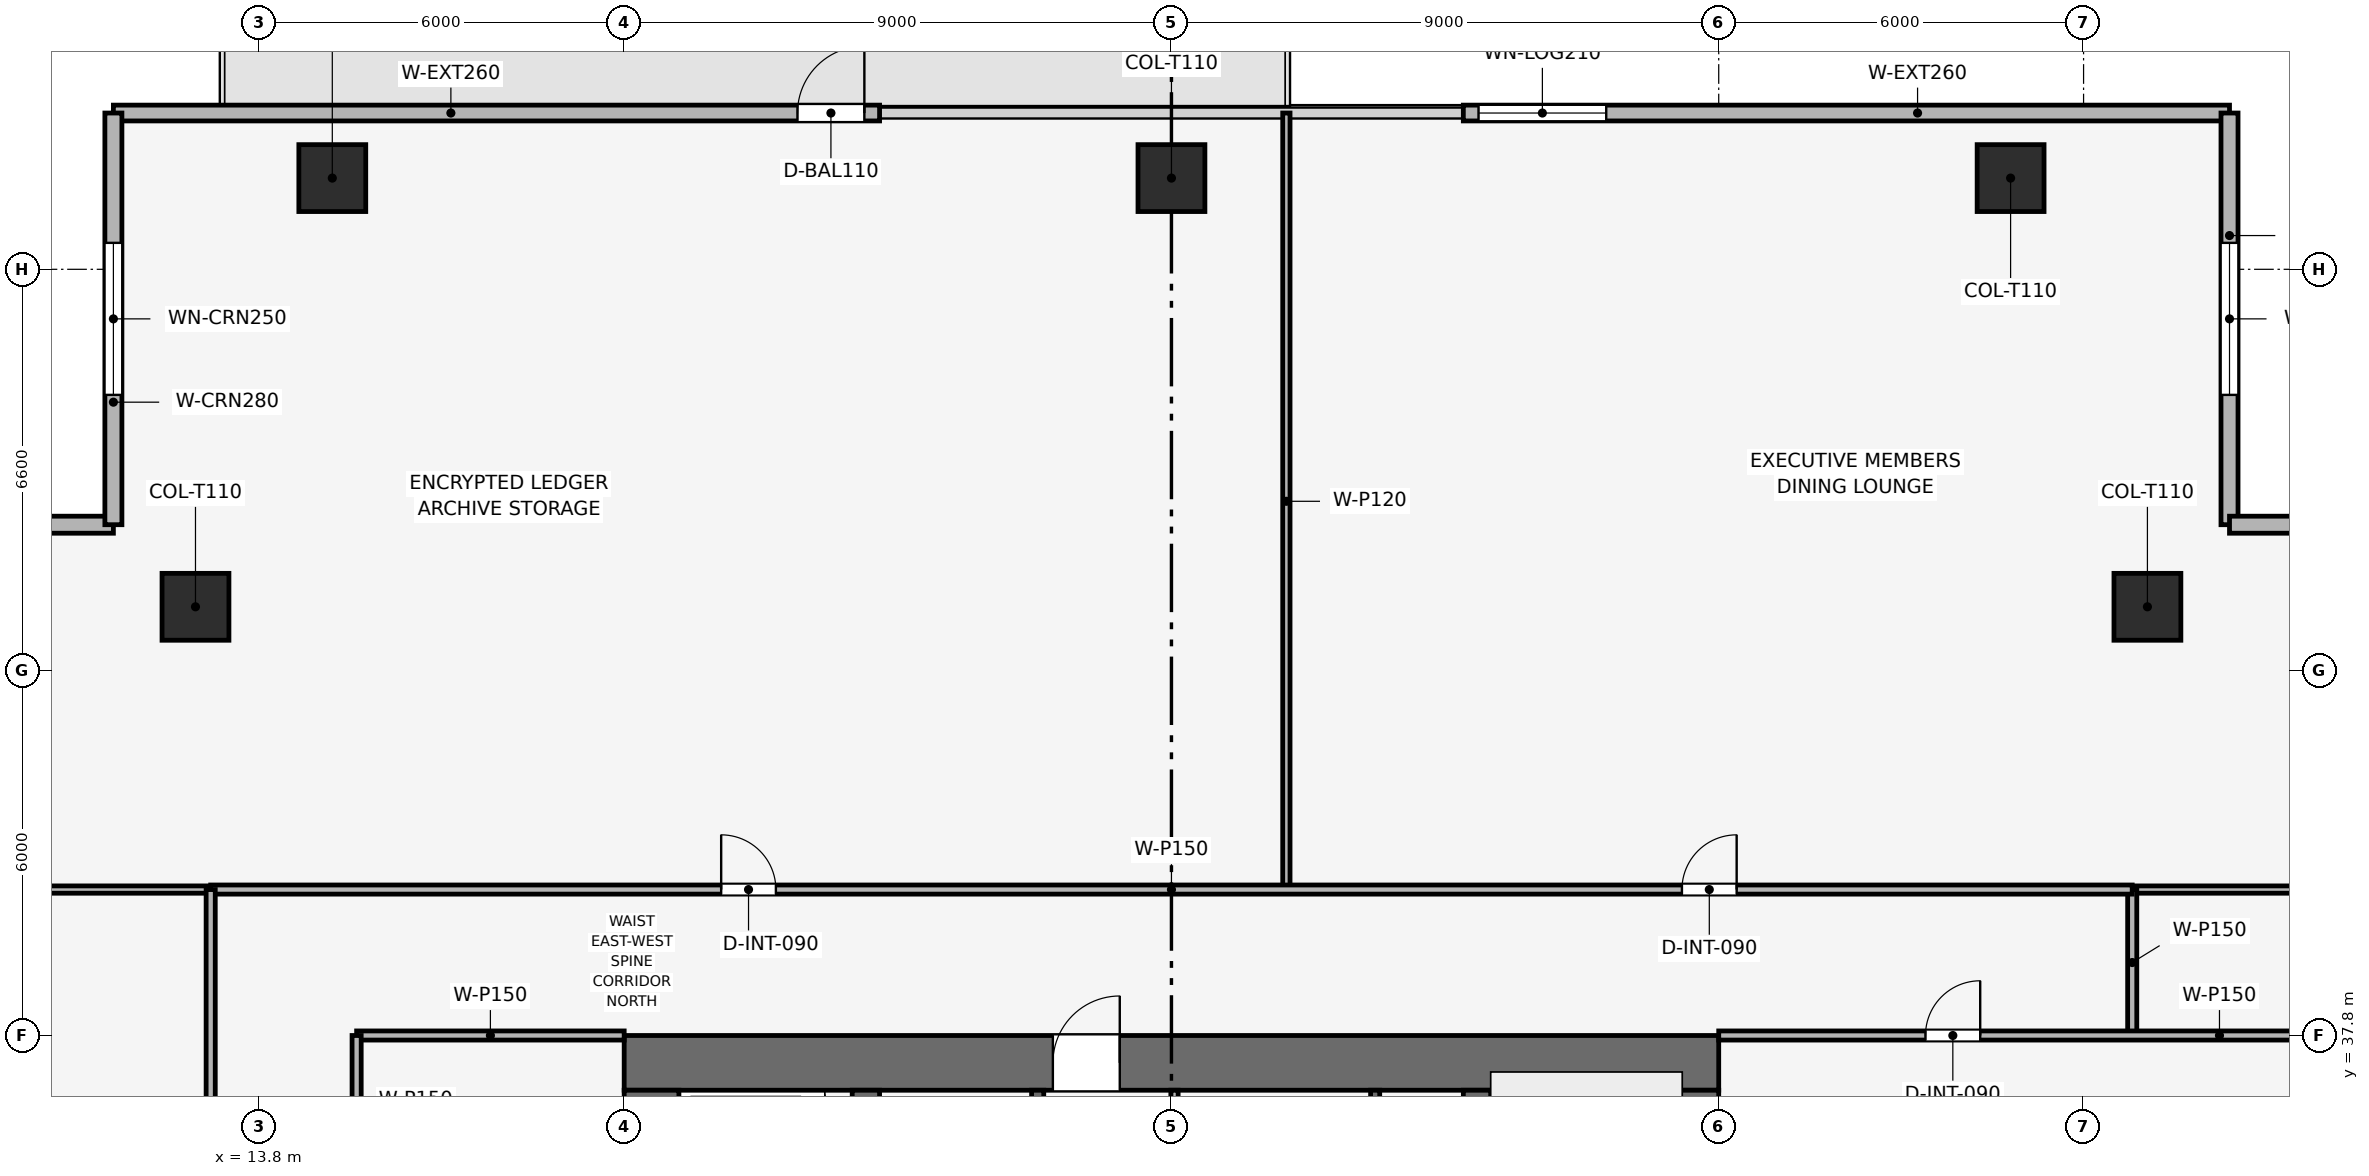
"""IFC4 building model, lengths in metres.
Left out: names, types, materials, properties, quantities, classifications, styles, units other than length and angle.
Written with IfcOpenShell. Run it as: python <this file> out.ifc"""

import sys

from ifc_helpers import new_model, si_unit, direction, frame, frame_2d, origin, origin_2d, place, context, subcontext, project, spatial, rectangle, extrude, element, fill, save


model = new_model("IFC4")
c1 = context("Model", 3, precision=1e-05, world=origin(), true_north=direction((0.0, 1.0)))
c2 = subcontext(c1, "Body", "Model", "MODEL_VIEW")
j1 = project(units=[si_unit("LENGTHUNIT", "METRE"), si_unit("PLANEANGLEUNIT", "RADIAN")], contexts=[c1])
p1 = place(None, origin())
s1 = spatial("IfcSite", under=j1, at=p1, CompositionType="ELEMENT")
p2 = place(p1, origin())
s2 = spatial("IfcBuilding", under=s1, at=p2, CompositionType="ELEMENT")
p3 = place(p2, frame((0.0, 0.0, 187.05)))
s3 = spatial("IfcBuildingStorey", under=s2, at=p3, CompositionType="ELEMENT", Elevation=187.05)
p4 = place(p3, frame((19.8, 37.35, 0.0), z_axis=(0.0, 0.0, 1.0), x_axis=(1.0, 0.0, 0.0)))
e1 = element("IfcWall", 1, at=p4, inside=s3, PredefinedType="SHEAR", context=c2, shape_type="SweptSolid", body=[
    extrude(rectangle(XDim=18.0, YDim=0.9, at=frame_2d((9.0, 0.0))), origin(), (0.0, 0.0, 1.0), 3.75),
])
p5 = place(p4, frame((7.05, 0.0, 0.0)))
e2 = element("IfcOpeningElement", 2, at=p5, cuts=e1, PredefinedType="OPENING", context=c2, shape_type="SweptSolid", body=[
    extrude(rectangle(XDim=1.1, YDim=2.15, at=frame_2d((0.55, 1.075))), frame((0.0, 0.46, 0.0), z_axis=(0.0, -1.0, 0.0), x_axis=(1.0, 0.0, 0.0)), (0.0, 0.0, 1.0), 0.92),
])
p6 = place(p3, frame((20.25, 20.7, 0.0), z_axis=(0.0, 0.0, 1.0), x_axis=(0.0, 1.0, 0.0)))
e3 = element("IfcWall", 3, at=p6, inside=s3, PredefinedType="SHEAR", context=c2, shape_type="SweptSolid", body=[
    extrude(rectangle(XDim=16.2, YDim=0.9, at=frame_2d((8.1, 0.0))), origin(), (0.0, 0.0, 1.0), 3.75),
])
p7 = place(p6, frame((10.1, 0.0, 0.0)))
e4 = element("IfcOpeningElement", 4, at=p7, cuts=e3, PredefinedType="OPENING", context=c2, shape_type="SweptSolid", body=[
    extrude(rectangle(XDim=1.1, YDim=2.15, at=frame_2d((0.55, 1.075))), frame((0.0, 0.46, 0.0), z_axis=(0.0, -1.0, 0.0), x_axis=(1.0, 0.0, 0.0)), (0.0, 0.0, 1.0), 0.92),
])
p8 = place(p3, frame((37.35, 20.7, 0.0), z_axis=(0.0, 0.0, 1.0), x_axis=(0.0, 1.0, 0.0)))
e5 = element("IfcWall", 5, at=p8, inside=s3, PredefinedType="SHEAR", context=c2, shape_type="SweptSolid", body=[
    extrude(rectangle(XDim=16.2, YDim=0.9, at=frame_2d((8.1, 0.0))), origin(), (0.0, 0.0, 1.0), 3.75),
])
p9 = place(p8, frame((4.6, 0.0, 0.0)))
e6 = element("IfcOpeningElement", 6, at=p9, cuts=e5, PredefinedType="OPENING", context=c2, shape_type="SweptSolid", body=[
    extrude(rectangle(XDim=1.1, YDim=2.15, at=frame_2d((0.55, 1.075))), frame((0.0, 0.46, 0.0), z_axis=(0.0, -1.0, 0.0), x_axis=(1.0, 0.0, 0.0)), (0.0, 0.0, 1.0), 0.92),
])
for number, where, z_axis, x_axis in (
    (7, (23.775, 20.7, 0.0), (0.0, 0.0, 1.0), (0.0, 1.0, 0.0)),
    (8, (33.825, 20.7, 0.0), (0.0, 0.0, 1.0), (0.0, 1.0, 0.0)),
):
    element("IfcWall", number, at=place(p3, frame(where, z_axis=z_axis, x_axis=x_axis)), inside=s3, PredefinedType="SHEAR", context=c2, shape_type="SweptSolid", body=[
        extrude(rectangle(XDim=16.2, YDim=0.45, at=frame_2d((8.1, 0.0))), origin(), (0.0, 0.0, 1.0), 3.75),
    ])
for number, where, z_axis, x_axis in (
    (9, (42.6, 51.9, 0.003), (0.0, 0.0, 1.0), (1.0, 0.0, 0.0)),
    (10, (28.8, 51.9, 0.003), (0.0, 0.0, 1.0), (1.0, 0.0, 0.0)),
    (11, (15.0, 51.9, 0.003), (0.0, 0.0, 1.0), (1.0, 0.0, 0.0)),
    (12, (44.85, 44.85, 0.003), (0.0, 0.0, 1.0), (1.0, 0.0, 0.0)),
    (13, (12.75, 44.85, 0.003), (0.0, 0.0, 1.0), (1.0, 0.0, 0.0)),
):
    element("IfcColumn", number, at=place(p3, frame(where, z_axis=z_axis, x_axis=x_axis)), inside=s3, PredefinedType="COLUMN", context=c2, shape_type="SweptSolid", body=[
        extrude(rectangle(XDim=1.1, YDim=1.1, at=origin_2d()), origin(), (0.0, 0.0, 1.0), 3.489),
    ])
p10 = place(p3, frame((11.4, 52.97, 0.0), z_axis=(0.0, 0.0, 1.0), x_axis=(1.0, 0.0, 0.0)))
e14 = element("IfcWall", 14, at=p10, inside=s3, PredefinedType="SOLIDWALL", context=c2, shape_type="SweptSolid", body=[
    extrude(rectangle(XDim=12.6, YDim=0.26, at=frame_2d((6.3, 0.0))), origin(), (0.0, 0.0, 1.0), 3.495),
])
p11 = place(p10, frame((11.25, 0.0, 0.0)))
e15 = element("IfcOpeningElement", 15, at=p11, cuts=e14, PredefinedType="OPENING", context=c2, shape_type="SweptSolid", body=[
    extrude(rectangle(XDim=1.1, YDim=2.2, at=frame_2d((0.55, 1.1))), frame((0.0, 0.14, 0.0), z_axis=(0.0, -1.0, 0.0), x_axis=(1.0, 0.0, 0.0)), (0.0, 0.0, 1.0), 0.28),
])
p12 = place(p3, frame((33.6, 52.97, 0.0), z_axis=(0.0, 0.0, 1.0), x_axis=(1.0, 0.0, 0.0)))
e16 = element("IfcWall", 16, at=p12, inside=s3, PredefinedType="SOLIDWALL", context=c2, shape_type="SweptSolid", body=[
    extrude(rectangle(XDim=12.6, YDim=0.26, at=frame_2d((6.3, 0.0))), origin(), (0.0, 0.0, 1.0), 3.495),
])
p13 = place(p12, frame((0.25, 0.0, 0.9)))
e17 = element("IfcOpeningElement", 17, at=p13, cuts=e16, PredefinedType="OPENING", context=c2, shape_type="SweptSolid", body=[
    extrude(rectangle(XDim=2.1, YDim=2.1, at=frame_2d((1.05, 1.05))), frame((0.0, 0.14, 0.0), z_axis=(0.0, -1.0, 0.0), x_axis=(1.0, 0.0, 0.0)), (0.0, 0.0, 1.0), 0.28),
])
p14 = place(p3, frame((4.63, 46.2, 0.0), z_axis=(0.0, 0.0, 1.0), x_axis=(1.0, 0.0, 0.0)))
e18 = element("IfcWall", 18, at=p14, inside=s3, PredefinedType="SOLIDWALL", context=c2, shape_type="SweptSolid", body=[
    extrude(rectangle(XDim=6.77, YDim=0.28, at=frame_2d((3.385, 0.0))), origin(), (0.0, 0.0, 1.0), 3.495),
])
p15 = place(p14, frame((2.135, 0.0, 0.9)))
e19 = element("IfcOpeningElement", 19, at=p15, cuts=e18, PredefinedType="OPENING", context=c2, shape_type="SweptSolid", body=[
    extrude(rectangle(XDim=2.5, YDim=1.9, at=frame_2d((1.25, 0.95))), frame((0.0, 0.15, 0.0), z_axis=(0.0, -1.0, 0.0), x_axis=(1.0, 0.0, 0.0)), (0.0, 0.0, 1.0), 0.3),
])
p16 = place(p3, frame((11.4, 46.2, 0.0), z_axis=(0.0, 0.0, 1.0), x_axis=(0.0, 1.0, 0.0)))
e20 = element("IfcWall", 20, at=p16, inside=s3, PredefinedType="SOLIDWALL", context=c2, shape_type="SweptSolid", body=[
    extrude(rectangle(XDim=6.77, YDim=0.28, at=frame_2d((3.385, 0.0))), origin(), (0.0, 0.0, 1.0), 3.495),
])
p17 = place(p16, frame((2.135, 0.0, 0.9)))
e21 = element("IfcOpeningElement", 21, at=p17, cuts=e20, PredefinedType="OPENING", context=c2, shape_type="SweptSolid", body=[
    extrude(rectangle(XDim=2.5, YDim=1.9, at=frame_2d((1.25, 0.95))), frame((0.0, 0.15, 0.0), z_axis=(0.0, -1.0, 0.0), x_axis=(1.0, 0.0, 0.0)), (0.0, 0.0, 1.0), 0.3),
])
p18 = place(p3, frame((46.2, 52.97, 0.0), z_axis=(0.0, 0.0, 1.0), x_axis=(0.0, -1.0, 0.0)))
e22 = element("IfcWall", 22, at=p18, inside=s3, PredefinedType="SOLIDWALL", context=c2, shape_type="SweptSolid", body=[
    extrude(rectangle(XDim=6.77, YDim=0.28, at=frame_2d((3.385, 0.0))), origin(), (0.0, 0.0, 1.0), 3.495),
])
p19 = place(p18, frame((2.135, 0.0, 0.9)))
e23 = element("IfcOpeningElement", 23, at=p19, cuts=e22, PredefinedType="OPENING", context=c2, shape_type="SweptSolid", body=[
    extrude(rectangle(XDim=2.5, YDim=1.9, at=frame_2d((1.25, 0.95))), frame((0.0, 0.15, 0.0), z_axis=(0.0, -1.0, 0.0), x_axis=(1.0, 0.0, 0.0)), (0.0, 0.0, 1.0), 0.3),
])
p20 = place(p3, frame((46.2, 46.2, 0.0), z_axis=(0.0, 0.0, 1.0), x_axis=(1.0, 0.0, 0.0)))
e24 = element("IfcWall", 24, at=p20, inside=s3, PredefinedType="SOLIDWALL", context=c2, shape_type="SweptSolid", body=[
    extrude(rectangle(XDim=6.77, YDim=0.28, at=frame_2d((3.385, 0.0))), origin(), (0.0, 0.0, 1.0), 3.495),
])
p21 = place(p20, frame((2.135, 0.0, 0.9)))
e25 = element("IfcOpeningElement", 25, at=p21, cuts=e24, PredefinedType="OPENING", context=c2, shape_type="SweptSolid", body=[
    extrude(rectangle(XDim=2.5, YDim=1.9, at=frame_2d((1.25, 0.95))), frame((0.0, 0.15, 0.0), z_axis=(0.0, -1.0, 0.0), x_axis=(1.0, 0.0, 0.0)), (0.0, 0.0, 1.0), 0.3),
])
p22 = place(p3, frame((32.15, 34.0, 0.0), z_axis=(0.0, 0.0, 1.0), x_axis=(0.0, 1.0, 0.0)))
e26 = element("IfcWall", 26, at=p22, inside=s3, PredefinedType="SHEAR", context=c2, shape_type="SweptSolid", body=[
    extrude(rectangle(XDim=2.9, YDim=0.15, at=frame_2d((1.45, 0.0))), origin(), (0.0, 0.0, 1.0), 3.495),
])
p23 = place(p3, frame((26.6, 34.0, 0.0), z_axis=(0.0, 0.0, 1.0), x_axis=(0.0, 1.0, 0.0)))
e27 = element("IfcWall", 27, at=p23, inside=s3, PredefinedType="SHEAR", context=c2, shape_type="SweptSolid", body=[
    extrude(rectangle(XDim=2.9, YDim=0.2, at=frame_2d((1.45, 0.0))), origin(), (0.0, 0.0, 1.0), 3.495),
])
p24 = place(p23, frame((0.75, 0.0, 0.0)))
e28 = element("IfcOpeningElement", 28, at=p24, cuts=e27, PredefinedType="OPENING", context=c2, shape_type="SweptSolid", body=[
    extrude(rectangle(XDim=1.1, YDim=2.15, at=frame_2d((0.55, 1.075))), frame((0.0, 0.11, 0.0), z_axis=(0.0, -1.0, 0.0), x_axis=(1.0, 0.0, 0.0)), (0.0, 0.0, 1.0), 0.22),
])
p25 = place(p3, frame((28.85, 33.925, 0.0), z_axis=(0.0, 0.0, 1.0), x_axis=(0.0, 1.0, 0.0)))
e29 = element("IfcWall", 29, at=p25, inside=s3, PredefinedType="PARTITIONING", context=c2, shape_type="SweptSolid", body=[
    extrude(rectangle(XDim=2.975, YDim=0.12, at=frame_2d((1.487, 0.0))), origin(), (0.0, 0.0, 1.0), 3.495),
])
p26 = place(p25, frame((0.25, 0.0, 0.0)))
e30 = element("IfcOpeningElement", 30, at=p26, cuts=e29, PredefinedType="OPENING", context=c2, shape_type="SweptSolid", body=[
    extrude(rectangle(XDim=0.85, YDim=2.1, at=frame_2d((0.425, 1.05))), frame((0.0, 0.07, 0.0), z_axis=(0.0, -1.0, 0.0), x_axis=(1.0, 0.0, 0.0)), (0.0, 0.0, 1.0), 0.14),
])
p27 = place(p25, frame((1.645, 0.0, 0.0)))
e31 = element("IfcOpeningElement", 31, at=p27, cuts=e29, PredefinedType="OPENING", context=c2, shape_type="SweptSolid", body=[
    extrude(rectangle(XDim=0.85, YDim=2.1, at=frame_2d((0.425, 1.05))), frame((0.0, 0.07, 0.0), z_axis=(0.0, -1.0, 0.0), x_axis=(1.0, 0.0, 0.0)), (0.0, 0.0, 1.0), 0.14),
])
p28 = place(p3, frame((15.4, 37.8, 0.0), z_axis=(0.0, 0.0, 1.0), x_axis=(1.0, 0.0, 0.0)))
e32 = element("IfcWall", 32, at=p28, inside=s3, PredefinedType="PARTITIONING", context=c2, shape_type="SweptSolid", body=[
    extrude(rectangle(XDim=4.4, YDim=0.15, at=frame_2d((2.2, 0.0))), origin(), (0.0, 0.0, 1.0), 3.03),
])
p29 = place(p3, frame((15.4, 32.45, 0.0), z_axis=(0.0, 0.0, 1.0), x_axis=(0.0, 1.0, 0.0)))
e33 = element("IfcWall", 33, at=p29, inside=s3, PredefinedType="PARTITIONING", context=c2, shape_type="SweptSolid", body=[
    extrude(rectangle(XDim=5.35, YDim=0.15, at=frame_2d((2.675, 0.0))), origin(), (0.0, 0.0, 1.0), 3.03),
])
p30 = place(p29, frame((2.1, 0.0, 0.0)))
e34 = element("IfcOpeningElement", 34, at=p30, cuts=e33, PredefinedType="OPENING", context=c2, shape_type="SweptSolid", body=[
    extrude(rectangle(XDim=0.9, YDim=2.1, at=frame_2d((0.45, 1.05))), frame((0.0, 0.085, 0.0), z_axis=(0.0, -1.0, 0.0), x_axis=(1.0, 0.0, 0.0)), (0.0, 0.0, 1.0), 0.17),
])
p31 = place(p3, frame((30.69, 40.2, 0.0), z_axis=(0.0, 0.0, 1.0), x_axis=(0.0, 1.0, 0.0)))
e35 = element("IfcWall", 35, at=p31, inside=s3, PredefinedType="PARTITIONING", context=c2, shape_type="SweptSolid", body=[
    extrude(rectangle(XDim=12.77, YDim=0.12, at=frame_2d((6.385, 0.0))), origin(), (0.0, 0.0, 1.0), 2.98),
])
p32 = place(p3, frame((4.63, 40.2, 0.0), z_axis=(0.0, 0.0, 1.0), x_axis=(1.0, 0.0, 0.0)))
e36 = element("IfcWall", 36, at=p32, inside=s3, PredefinedType="PARTITIONING", context=c2, shape_type="SweptSolid", body=[
    extrude(rectangle(XDim=8.37, YDim=0.12, at=frame_2d((4.185, 0.0))), origin(), (0.0, 0.0, 1.0), 2.98),
])
p33 = place(p3, frame((44.6, 40.2, 0.0), z_axis=(0.0, 0.0, 1.0), x_axis=(1.0, 0.0, 0.0)))
e37 = element("IfcWall", 37, at=p33, inside=s3, PredefinedType="PARTITIONING", context=c2, shape_type="SweptSolid", body=[
    extrude(rectangle(XDim=8.37, YDim=0.12, at=frame_2d((4.185, 0.0))), origin(), (0.0, 0.0, 1.0), 2.98),
])
p34 = place(p3, frame((44.6, 37.8, 0.0), z_axis=(0.0, 0.0, 1.0), x_axis=(0.0, 1.0, 0.0)))
e38 = element("IfcWall", 38, at=p34, inside=s3, PredefinedType="PARTITIONING", context=c2, shape_type="SweptSolid", body=[
    extrude(rectangle(XDim=2.4, YDim=0.15, at=frame_2d((1.2, 0.0))), origin(), (0.0, 0.0, 1.0), 3.495),
])
p35 = place(p3, frame((37.8, 37.8, 0.0), z_axis=(0.0, 0.0, 1.0), x_axis=(1.0, 0.0, 0.0)))
e39 = element("IfcWall", 39, at=p35, inside=s3, PredefinedType="PARTITIONING", context=c2, shape_type="SweptSolid", body=[
    extrude(rectangle(XDim=15.17, YDim=0.15, at=frame_2d((7.585, 0.0))), origin(), (0.0, 0.0, 1.0), 2.98),
])
p36 = place(p35, frame((3.4, 0.0, 0.0)))
e40 = element("IfcOpeningElement", 40, at=p36, cuts=e39, PredefinedType="OPENING", context=c2, shape_type="SweptSolid", body=[
    extrude(rectangle(XDim=0.9, YDim=2.1, at=frame_2d((0.45, 1.05))), frame((0.0, 0.085, 0.0), z_axis=(0.0, -1.0, 0.0), x_axis=(1.0, 0.0, 0.0)), (0.0, 0.0, 1.0), 0.17),
])
p37 = place(p3, frame((13.0, 40.2, 0.0), z_axis=(0.0, 0.0, 1.0), x_axis=(1.0, 0.0, 0.0)))
e41 = element("IfcWall", 41, at=p37, inside=s3, PredefinedType="PARTITIONING", context=c2, shape_type="SweptSolid", body=[
    extrude(rectangle(XDim=31.6, YDim=0.15, at=frame_2d((15.8, 0.0))), origin(), (0.0, 0.0, 1.0), 3.03),
])
p38 = place(p37, frame((8.395, 0.0, 0.0)))
e42 = element("IfcOpeningElement", 42, at=p38, cuts=e41, PredefinedType="OPENING", context=c2, shape_type="SweptSolid", body=[
    extrude(rectangle(XDim=0.9, YDim=2.1, at=frame_2d((0.45, 1.05))), frame((0.0, 0.085, 0.0), z_axis=(0.0, -1.0, 0.0), x_axis=(1.0, 0.0, 0.0)), (0.0, 0.0, 1.0), 0.17),
])
p39 = place(p37, frame((24.195, 0.0, 0.0)))
e43 = element("IfcOpeningElement", 43, at=p39, cuts=e41, PredefinedType="OPENING", context=c2, shape_type="SweptSolid", body=[
    extrude(rectangle(XDim=0.9, YDim=2.1, at=frame_2d((0.45, 1.05))), frame((0.0, 0.085, 0.0), z_axis=(0.0, -1.0, 0.0), x_axis=(1.0, 0.0, 0.0)), (0.0, 0.0, 1.0), 0.17),
])
p40 = place(p3, frame((13.0, 17.4, 0.0), z_axis=(0.0, 0.0, 1.0), x_axis=(0.0, 1.0, 0.0)))
e44 = element("IfcWall", 44, at=p40, inside=s3, PredefinedType="PARTITIONING", context=c2, shape_type="SweptSolid", body=[
    extrude(rectangle(XDim=22.8, YDim=0.15, at=frame_2d((11.4, 0.0))), origin(), (0.0, 0.0, 1.0), 3.03),
])
p41 = place(p40, frame((10.95, 0.0, 0.0)))
e45 = element("IfcOpeningElement", 45, at=p41, cuts=e44, PredefinedType="OPENING", context=c2, shape_type="SweptSolid", body=[
    extrude(rectangle(XDim=0.9, YDim=2.1, at=frame_2d((0.45, 1.05))), frame((0.0, 0.085, 0.0), z_axis=(0.0, -1.0, 0.0), x_axis=(1.0, 0.0, 0.0)), (0.0, 0.0, 1.0), 0.17),
])
p42 = place(p11, origin())
e46 = element("IfcDoor", 46, at=p42, inside=s3, OperationType="SINGLE_SWING_RIGHT", PredefinedType="DOOR", context=c2, shape_type="SweptSolid", body=[
    extrude(rectangle(XDim=1.1, YDim=2.2, at=frame_2d((0.55, 1.1))), frame((0.0, 0.025, 0.0), z_axis=(0.0, -1.0, 0.0), x_axis=(1.0, 0.0, 0.0)), (0.0, 0.0, 1.0), 0.05),
])
fill(e15, e46)
p43 = place(p13, origin())
e47 = element("IfcWindow", 47, at=p43, inside=s3, PartitioningType="SINGLE_PANEL", PredefinedType="WINDOW", context=c2, shape_type="SweptSolid", body=[
    extrude(rectangle(XDim=2.1, YDim=2.1, at=frame_2d((1.05, 1.05))), frame((0.0, 0.03, 0.0), z_axis=(0.0, -1.0, 0.0), x_axis=(1.0, 0.0, 0.0)), (0.0, 0.0, 1.0), 0.06),
])
fill(e17, e47)
p44 = place(p17, origin())
e48 = element("IfcWindow", 48, at=p44, inside=s3, PartitioningType="SINGLE_PANEL", PredefinedType="WINDOW", context=c2, shape_type="SweptSolid", body=[
    extrude(rectangle(XDim=2.5, YDim=1.9, at=frame_2d((1.25, 0.95))), frame((0.0, 0.03, 0.0), z_axis=(0.0, -1.0, 0.0), x_axis=(1.0, 0.0, 0.0)), (0.0, 0.0, 1.0), 0.06),
])
fill(e21, e48)
p45 = place(p19, origin())
e49 = element("IfcWindow", 49, at=p45, inside=s3, PartitioningType="SINGLE_PANEL", PredefinedType="WINDOW", context=c2, shape_type="SweptSolid", body=[
    extrude(rectangle(XDim=2.5, YDim=1.9, at=frame_2d((1.25, 0.95))), frame((0.0, 0.03, 0.0), z_axis=(0.0, -1.0, 0.0), x_axis=(1.0, 0.0, 0.0)), (0.0, 0.0, 1.0), 0.06),
])
fill(e23, e49)
p46 = place(p36, origin())
e50 = element("IfcDoor", 50, at=p46, inside=s3, OperationType="SINGLE_SWING_RIGHT", PredefinedType="DOOR", context=c2, shape_type="SweptSolid", body=[
    extrude(rectangle(XDim=0.9, YDim=2.1, at=frame_2d((0.45, 1.05))), frame((0.0, 0.025, 0.0), z_axis=(0.0, -1.0, 0.0), x_axis=(1.0, 0.0, 0.0)), (0.0, 0.0, 1.0), 0.05),
])
fill(e40, e50)
p47 = place(p38, origin())
e51 = element("IfcDoor", 51, at=p47, inside=s3, OperationType="SINGLE_SWING_LEFT", PredefinedType="DOOR", context=c2, shape_type="SweptSolid", body=[
    extrude(rectangle(XDim=0.9, YDim=2.1, at=frame_2d((0.45, 1.05))), frame((0.0, 0.025, 0.0), z_axis=(0.0, -1.0, 0.0), x_axis=(1.0, 0.0, 0.0)), (0.0, 0.0, 1.0), 0.05),
])
fill(e42, e51)
p48 = place(p39, origin())
e52 = element("IfcDoor", 52, at=p48, inside=s3, OperationType="SINGLE_SWING_RIGHT", PredefinedType="DOOR", context=c2, shape_type="SweptSolid", body=[
    extrude(rectangle(XDim=0.9, YDim=2.1, at=frame_2d((0.45, 1.05))), frame((0.0, 0.025, 0.0), z_axis=(0.0, -1.0, 0.0), x_axis=(1.0, 0.0, 0.0)), (0.0, 0.0, 1.0), 0.05),
])
fill(e43, e52)
p49 = place(p5, origin())
e53 = element("IfcDoor", 53, at=p49, inside=s3, OperationType="SINGLE_SWING_RIGHT", PredefinedType="DOOR", context=c2, shape_type="SweptSolid", body=[
    extrude(rectangle(XDim=1.1, YDim=2.15, at=frame_2d((0.55, 1.075))), frame((0.0, 0.025, 0.0), z_axis=(0.0, -1.0, 0.0), x_axis=(1.0, 0.0, 0.0)), (0.0, 0.0, 1.0), 0.05),
])
fill(e2, e53)
save(model, sys.argv[1])
